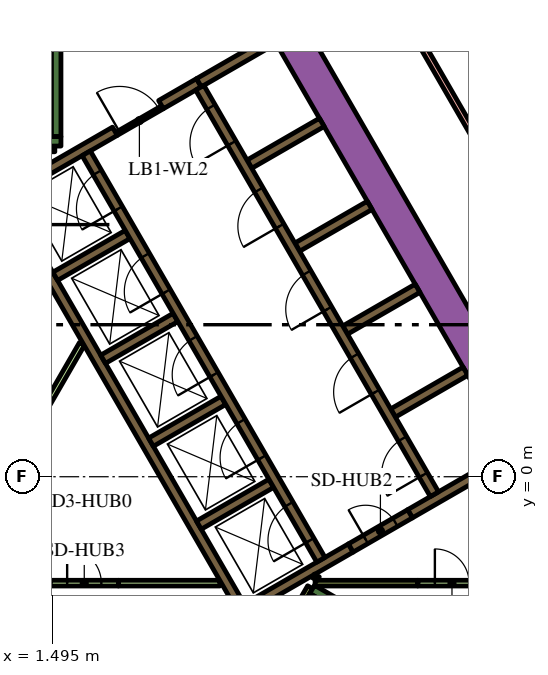
"""IFC4 building model, lengths in metres.
Left out: names, types, materials, properties, quantities, classifications, styles, units other than length and angle.
Written with IfcOpenShell. Run it as: python <this file> out.ifc"""

import sys

from ifc_helpers import new_model, si_unit, direction, frame, frame_2d, origin, place, context, subcontext, project, spatial, polyline, rectangle, outline, extrude, element, fill, save


model = new_model("IFC4")
c1 = context("Model", 3, precision=1e-05, world=origin(), true_north=direction((0.0, 1.0)))
c2 = subcontext(c1, "Body", "Model", "MODEL_VIEW")
j1 = project(units=[si_unit("LENGTHUNIT", "METRE"), si_unit("PLANEANGLEUNIT", "RADIAN")], contexts=[c1])
p1 = place(None, origin())
s1 = spatial("IfcSite", under=j1, at=p1, CompositionType="ELEMENT")
p2 = place(p1, origin())
s2 = spatial("IfcBuilding", under=s1, at=p2, CompositionType="ELEMENT")
p3 = place(p2, frame((0.0, 0.0, 134.4)))
s3 = spatial("IfcBuildingStorey", under=s2, at=p3, CompositionType="ELEMENT", Elevation=134.4)
p4 = place(p3, frame((6.776, 13.364, 0.0), z_axis=(0.0, 0.0, 1.0), x_axis=(0.500004177138, -0.8660229921, 0.0)))
e1 = element("IfcWall", 1, at=p4, inside=s3, PredefinedType="SOLIDWALL", context=c2, shape_type="SweptSolid", body=[
    extrude(rectangle(XDim=20.204, YDim=0.9, at=frame_2d((10.102, 0.0))), origin(), (0.0, 0.0, 1.0), 7.2),
])
p5 = place(p3, frame((8.334, -2.964, 0.0), z_axis=(0.0, 0.0, 1.0), x_axis=(0.866016039709, -0.500016218704, 0.0)))
e2 = element("IfcWall", 2, at=p5, inside=s3, PredefinedType="SOLIDWALL", context=c2, shape_type="SweptSolid", body=[
    extrude(rectangle(XDim=7.05, YDim=0.25, at=frame_2d((3.525, 0.0))), origin(), (0.0, 0.0, 1.0), 7.2),
])
p6 = place(p3, frame((8.163, -3.511, 0.0), z_axis=(0.0, 0.0, 1.0), x_axis=(0.500127794843, 0.865951608824, 0.0)))
e3 = element("IfcWall", 3, at=p6, inside=s3, PredefinedType="SOLIDWALL", context=c2, shape_type="SweptSolid", body=[
    extrude(rectangle(XDim=0.435, YDim=0.25, at=frame_2d((0.217, 0.0))), origin(), (0.0, 0.0, 1.0), 7.2),
])
p7 = place(p3, frame((1.6, 8.95, 0.0), z_axis=(0.0, 0.0, 1.0), x_axis=(0.0, 1.0, 0.0)))
e4 = element("IfcWall", 4, at=p7, inside=s3, PredefinedType="SOLIDWALL", context=c2, shape_type="SweptSolid", body=[
    extrude(rectangle(XDim=6.8, YDim=0.25, at=frame_2d((3.4, 0.0))), origin(), (0.0, 0.0, 1.0), 7.2),
])
p8 = place(p3, frame((1.05, 8.825, 0.0), z_axis=(0.0, 0.0, 1.0), x_axis=(1.0, 0.0, 0.0)))
e5 = element("IfcWall", 5, at=p8, inside=s3, PredefinedType="SOLIDWALL", context=c2, shape_type="SweptSolid", body=[
    extrude(rectangle(XDim=0.675, YDim=0.25, at=frame_2d((0.337, 0.0))), origin(), (0.0, 0.0, 1.0), 7.2),
])
p9 = place(p3, origin())
e6 = element("IfcWall", 6, at=p9, inside=s3, PredefinedType="SOLIDWALL", context=c2, shape_type="SweptSolid", body=[
    extrude(outline(polyline([(0.335, 6.925), (0.335, 6.925), (0.335, 7.075), (0.335, 7.075), (0.335, 7.075), (0.245, 7.075), (0.035, 7.439), (0.252, 7.564), (0.377, 7.348), (1.512, 5.382), (1.637, 5.165), (2.221, 4.153), (2.771, 3.199), (2.896, 2.983), (3.138, 2.564), (4.031, 1.017), (4.156, 0.801), (5.292, -1.165), (5.417, -1.382), (6.073, -2.519), (6.552, -3.348), (6.677, -3.564), (6.46, -3.689), (0.332, 6.925), (0.335, 6.925), (0.335, 6.925)])), origin(), (0.0, 0.0, 1.0), 7.2),
])
p10 = place(p3, frame((4.358, 9.791, 0.0), z_axis=(0.0, 0.0, 1.0), x_axis=(0.866079547155, 0.499906209203, 0.0)))
e7 = element("IfcWall", 7, at=p10, inside=s3, PredefinedType="SOLIDWALL", context=c2, shape_type="SweptSolid", body=[
    extrude(rectangle(XDim=1.15, YDim=0.25, at=frame_2d((0.575, 0.0))), origin(), (0.0, 0.0, 1.0), 7.2),
])
p11 = place(p3, frame((5.356, 10.367, 0.0), z_axis=(0.0, 0.0, 1.0), x_axis=(0.865978535641, 0.50008116922, 0.0)))
e8 = element("IfcWall", 8, at=p11, inside=s3, PredefinedType="SOLIDWALL", context=c2, shape_type="SweptSolid", body=[
    extrude(rectangle(XDim=2.278, YDim=0.25, at=frame_2d((1.139, 0.0))), origin(), (0.0, 0.0, 1.0), 7.2),
])
p12 = place(p3, frame((0.314, 7.456, 0.0), z_axis=(0.0, 0.0, 1.0), x_axis=(0.866013897511, 0.50001992892, 0.0)))
e9 = element("IfcWall", 9, at=p12, inside=s3, PredefinedType="SOLIDWALL", context=c2, shape_type="SweptSolid", body=[
    extrude(rectangle(XDim=3.268, YDim=0.25, at=frame_2d((1.634, 0.0))), origin(), (0.0, 0.0, 1.0), 7.2),
])
p13 = place(p3, frame((1.574, 5.274, 0.0), z_axis=(0.0, 0.0, 1.0), x_axis=(0.866028486751, 0.499994660107, 0.0)))
e10 = element("IfcWall", 10, at=p13, inside=s3, PredefinedType="SOLIDWALL", context=c2, shape_type="SweptSolid", body=[
    extrude(rectangle(XDim=2.2, YDim=0.25, at=frame_2d((1.1, 0.0))), origin(), (0.0, 0.0, 1.0), 7.2),
])
for number, where, z_axis, x_axis in (
    (11, (2.834, 3.091, 0.0), (0.0, 0.0, 1.0), (0.866, 0.5, 0.0)),
    (12, (4.094, 0.909, 0.0), (0.0, 0.0, 1.0), (0.866, 0.5, 0.0)),
    (13, (5.354, -1.274, 0.0), (0.0, 0.0, 1.0), (0.866, 0.5, 0.0)),
):
    element("IfcWall", number, at=place(p3, frame(where, z_axis=z_axis, x_axis=x_axis)), inside=s3, PredefinedType="SOLIDWALL", context=c2, shape_type="SweptSolid", body=[
        extrude(rectangle(XDim=2.2, YDim=0.25, at=frame_2d((1.1, 0.0))), origin(), (0.0, 0.0, 1.0), 7.2),
    ])
p14 = place(p3, frame((9.352, -1.875, 0.0), z_axis=(0.0, 0.0, 1.0), x_axis=(-0.866024844342, -0.500000968981, 0.0)))
e14 = element("IfcWall", 14, at=p14, inside=s3, PredefinedType="SOLIDWALL", context=c2, shape_type="SweptSolid", body=[
    extrude(rectangle(XDim=3.162, YDim=0.25, at=frame_2d((1.581, 0.0))), origin(), (0.0, 0.0, 1.0), 7.2),
])
for number, where, z_axis, x_axis in (
    (15, (6.684, 8.224, 0.0), (0.0, 0.0, 1.0), (0.866, 0.5, 0.0)),
    (16, (7.944, 6.041, 0.0), (0.0, 0.0, 1.0), (0.866, 0.5, 0.0)),
    (17, (9.204, 3.859, 0.0), (0.0, 0.0, 1.0), (0.866, 0.5, 0.0)),
):
    element("IfcWall", number, at=place(p3, frame(where, z_axis=z_axis, x_axis=x_axis)), inside=s3, PredefinedType="SOLIDWALL", context=c2, shape_type="SweptSolid", body=[
        extrude(rectangle(XDim=2.2, YDim=0.25, at=frame_2d((1.1, 0.0))), origin(), (0.0, 0.0, 1.0), 7.2),
    ])
p15 = place(p3, frame((10.911, -0.975, 0.0), z_axis=(0.0, 0.0, 1.0), x_axis=(0.866046979468, 0.499962627957, 0.0)))
e18 = element("IfcWall", 18, at=p15, inside=s3, PredefinedType="SOLIDWALL", context=c2, shape_type="SweptSolid", body=[
    extrude(rectangle(XDim=3.138, YDim=0.25, at=frame_2d((1.569, 0.0))), origin(), (0.0, 0.0, 1.0), 7.2),
])
p16 = place(p3, frame((10.464, 1.677, 0.0), z_axis=(0.0, 0.0, 1.0), x_axis=(0.86605622881, 0.499946605688, 0.0)))
e19 = element("IfcWall", 19, at=p16, inside=s3, PredefinedType="SOLIDWALL", context=c2, shape_type="SweptSolid", body=[
    extrude(rectangle(XDim=2.2, YDim=0.25, at=frame_2d((1.1, 0.0))), origin(), (0.0, 0.0, 1.0), 7.2),
])
p17 = place(p3, frame((8.412, -2.8, 0.0), z_axis=(0.0, 0.0, 1.0), x_axis=(1.0, 0.0, 0.0)))
e20 = element("IfcWall", 20, at=p17, inside=s3, PredefinedType="PARTITIONING", context=c2, shape_type="SweptSolid", body=[
    extrude(rectangle(XDim=2.702, YDim=0.15, at=frame_2d((1.351, 0.0))), origin(), (0.0, 0.0, 1.0), 7.2),
])
p18 = place(p3, frame((8.459, -2.599, 0.0), z_axis=(0.0, 0.0, 1.0), x_axis=(-0.501919277433, -0.864914469148, 0.0)))
e21 = element("IfcWall", 21, at=p18, inside=s3, PredefinedType="PARTITIONING", context=c2, shape_type="SweptSolid", body=[
    extrude(rectangle(XDim=0.109, YDim=0.15, at=frame_2d((0.054, 0.0))), origin(), (0.0, 0.0, 1.0), 7.2),
])
p19 = place(p3, frame((8.281, -2.907, 0.0), z_axis=(0.0, 0.0, 1.0), x_axis=(-0.500193841991, -0.86591346013, 0.0)))
e22 = element("IfcWall", 22, at=p19, inside=s3, PredefinedType="PARTITIONING", context=c2, shape_type="SweptSolid", body=[
    extrude(rectangle(XDim=0.583, YDim=0.15, at=frame_2d((0.292, 0.0))), origin(), (0.0, 0.0, 1.0), 7.2),
])
p20 = place(p3, frame((3.238, -2.8, 0.0), z_axis=(0.0, 0.0, 1.0), x_axis=(1.0, 0.0, 0.0)))
e23 = element("IfcWall", 23, at=p20, inside=s3, PredefinedType="PARTITIONING", context=c2, shape_type="SweptSolid", body=[
    extrude(rectangle(XDim=2.672, YDim=0.15, at=frame_2d((1.336, 0.0))), origin(), (0.0, 0.0, 1.0), 6.15),
])
p21 = place(p3, frame((1.016, 1.309, 0.0), z_axis=(0.0, 0.0, 1.0), x_axis=(0.49998231768, 0.866035612436, 0.0)))
e24 = element("IfcWall", 24, at=p21, inside=s3, PredefinedType="PARTITIONING", context=c2, shape_type="SweptSolid", body=[
    extrude(rectangle(XDim=2.521, YDim=0.15, at=frame_2d((1.26, 0.0))), origin(), (0.0, 0.0, 1.0), 6.15),
])
p22 = place(p3, frame((1.05, 8.625, 0.0), z_axis=(0.0, 0.0, 1.0), x_axis=(1.0, 0.0, 0.0)))
e25 = element("IfcWall", 25, at=p22, inside=s3, PredefinedType="PARTITIONING", context=c2, shape_type="SweptSolid", body=[
    extrude(rectangle(XDim=0.514, YDim=0.15, at=frame_2d((0.257, 0.0))), origin(), (0.0, 0.0, 1.0), 6.15),
])
p23 = place(p3, frame((11.553, -0.46, 0.0), z_axis=(0.0, 0.0, 1.0), x_axis=(-0.500006514828, 0.866021642414, 0.0)))
e26 = element("IfcWall", 26, at=p23, inside=s3, PredefinedType="SOLIDWALL", context=c2, shape_type="SweptSolid", body=[
    extrude(rectangle(XDim=12.35, YDim=0.25, at=frame_2d((6.175, 0.0))), origin(), (0.0, 0.0, 1.0), 7.2),
])
p24 = place(p23, frame((0.585, 0.0, 0.0)))
e27 = element("IfcOpeningElement", 27, at=p24, cuts=e26, PredefinedType="OPENING", context=c2, shape_type="SweptSolid", body=[
    extrude(rectangle(XDim=1.1, YDim=2.1, at=frame_2d((0.55, 1.05))), frame((0.0, 0.135, 0.0), z_axis=(0.0, -1.0, 0.0), x_axis=(1.0, 0.0, 0.0)), (0.0, 0.0, 1.0), 0.27),
])
p25 = place(p23, frame((3.105, 0.0, 0.0)))
e28 = element("IfcOpeningElement", 28, at=p25, cuts=e26, PredefinedType="OPENING", context=c2, shape_type="SweptSolid", body=[
    extrude(rectangle(XDim=1.1, YDim=2.1, at=frame_2d((0.55, 1.05))), frame((0.0, 0.135, 0.0), z_axis=(0.0, -1.0, 0.0), x_axis=(1.0, 0.0, 0.0)), (0.0, 0.0, 1.0), 0.27),
])
p26 = place(p23, frame((5.625, 0.0, 0.0)))
e29 = element("IfcOpeningElement", 29, at=p26, cuts=e26, PredefinedType="OPENING", context=c2, shape_type="SweptSolid", body=[
    extrude(rectangle(XDim=1.1, YDim=2.1, at=frame_2d((0.55, 1.05))), frame((0.0, 0.135, 0.0), z_axis=(0.0, -1.0, 0.0), x_axis=(1.0, 0.0, 0.0)), (0.0, 0.0, 1.0), 0.27),
])
p27 = place(p23, frame((8.145, 0.0, 0.0)))
e30 = element("IfcOpeningElement", 30, at=p27, cuts=e26, PredefinedType="OPENING", context=c2, shape_type="SweptSolid", body=[
    extrude(rectangle(XDim=1.1, YDim=2.1, at=frame_2d((0.55, 1.05))), frame((0.0, 0.135, 0.0), z_axis=(0.0, -1.0, 0.0), x_axis=(1.0, 0.0, 0.0)), (0.0, 0.0, 1.0), 0.27),
])
p28 = place(p23, frame((10.665, 0.0, 0.0)))
e31 = element("IfcOpeningElement", 31, at=p28, cuts=e26, PredefinedType="OPENING", context=c2, shape_type="SweptSolid", body=[
    extrude(rectangle(XDim=1.1, YDim=2.1, at=frame_2d((0.55, 1.05))), frame((0.0, 0.135, 0.0), z_axis=(0.0, -1.0, 0.0), x_axis=(1.0, 0.0, 0.0)), (0.0, 0.0, 1.0), 0.27),
])
p29 = place(p3, frame((8.565, -2.185, 0.0), z_axis=(0.0, 0.0, 1.0), x_axis=(-0.499997954832, 0.866026584559, 0.0)))
e32 = element("IfcWall", 32, at=p29, inside=s3, PredefinedType="SOLIDWALL", context=c2, shape_type="SweptSolid", body=[
    extrude(rectangle(XDim=12.35, YDim=0.25, at=frame_2d((6.175, 0.0))), origin(), (0.0, 0.0, 1.0), 7.2),
])
p30 = place(p29, frame((0.585, 0.0, 0.0)))
e33 = element("IfcOpeningElement", 33, at=p30, cuts=e32, PredefinedType="OPENING", context=c2, shape_type="SweptSolid", body=[
    extrude(rectangle(XDim=1.1, YDim=2.1, at=frame_2d((0.55, 1.05))), frame((0.0, 0.135, 0.0), z_axis=(0.0, -1.0, 0.0), x_axis=(1.0, 0.0, 0.0)), (0.0, 0.0, 1.0), 0.27),
])
p31 = place(p29, frame((3.105, 0.0, 0.0)))
e34 = element("IfcOpeningElement", 34, at=p31, cuts=e32, PredefinedType="OPENING", context=c2, shape_type="SweptSolid", body=[
    extrude(rectangle(XDim=1.1, YDim=2.1, at=frame_2d((0.55, 1.05))), frame((0.0, 0.135, 0.0), z_axis=(0.0, -1.0, 0.0), x_axis=(1.0, 0.0, 0.0)), (0.0, 0.0, 1.0), 0.27),
])
p32 = place(p29, frame((5.625, 0.0, 0.0)))
e35 = element("IfcOpeningElement", 35, at=p32, cuts=e32, PredefinedType="OPENING", context=c2, shape_type="SweptSolid", body=[
    extrude(rectangle(XDim=1.1, YDim=2.1, at=frame_2d((0.55, 1.05))), frame((0.0, 0.135, 0.0), z_axis=(0.0, -1.0, 0.0), x_axis=(1.0, 0.0, 0.0)), (0.0, 0.0, 1.0), 0.27),
])
p33 = place(p29, frame((8.145, 0.0, 0.0)))
e36 = element("IfcOpeningElement", 36, at=p33, cuts=e32, PredefinedType="OPENING", context=c2, shape_type="SweptSolid", body=[
    extrude(rectangle(XDim=1.1, YDim=2.1, at=frame_2d((0.55, 1.05))), frame((0.0, 0.135, 0.0), z_axis=(0.0, -1.0, 0.0), x_axis=(1.0, 0.0, 0.0)), (0.0, 0.0, 1.0), 0.27),
])
p34 = place(p29, frame((10.665, 0.0, 0.0)))
e37 = element("IfcOpeningElement", 37, at=p34, cuts=e32, PredefinedType="OPENING", context=c2, shape_type="SweptSolid", body=[
    extrude(rectangle(XDim=1.1, YDim=2.1, at=frame_2d((0.55, 1.05))), frame((0.0, 0.135, 0.0), z_axis=(0.0, -1.0, 0.0), x_axis=(1.0, 0.0, 0.0)), (0.0, 0.0, 1.0), 0.27),
])
p35 = place(p3, frame((3.183, 9.02, 0.0), z_axis=(0.0, 0.0, 1.0), x_axis=(0.866034573852, 0.49998411664, 0.0)))
e38 = element("IfcWall", 38, at=p35, inside=s3, PredefinedType="PARTITIONING", context=c2, shape_type="SweptSolid", body=[
    extrude(rectangle(XDim=1.4, YDim=0.09, at=frame_2d((0.7, 0.0))), origin(), (0.0, 0.0, 1.0), 6.15),
])
p36 = place(p35, frame((0.1, 0.0, 0.0)))
e39 = element("IfcOpeningElement", 39, at=p36, cuts=e38, PredefinedType="OPENING", context=c2, shape_type="SweptSolid", body=[
    extrude(rectangle(XDim=1.2, YDim=2.1, at=frame_2d((0.6, 1.05))), frame((0.0, 0.055, 0.0), z_axis=(0.0, -1.0, 0.0), x_axis=(1.0, 0.0, 0.0)), (0.0, 0.0, 1.0), 0.11),
])
p37 = place(p3, frame((9.352, -1.875, 0.0), z_axis=(0.0, 0.0, 1.0), x_axis=(0.865989075817, 0.500062916607, 0.0)))
e40 = element("IfcWall", 40, at=p37, inside=s3, PredefinedType="SOLIDWALL", context=c2, shape_type="SweptSolid", body=[
    extrude(rectangle(XDim=1.8, YDim=0.25, at=frame_2d((0.9, 0.0))), origin(), (0.0, 0.0, 1.0), 7.2),
])
p38 = place(p37, frame((0.45, 0.0, 0.0)))
e41 = element("IfcOpeningElement", 41, at=p38, cuts=e40, PredefinedType="OPENING", context=c2, shape_type="SweptSolid", body=[
    extrude(rectangle(XDim=0.9, YDim=2.1, at=frame_2d((0.45, 1.05))), frame((0.0, 0.135, 0.0), z_axis=(0.0, -1.0, 0.0), x_axis=(1.0, 0.0, 0.0)), (0.0, 0.0, 1.0), 0.27),
])
p39 = place(p3, frame((1.438, -2.8, 0.0), z_axis=(0.0, 0.0, 1.0), x_axis=(1.0, 0.0, 0.0)))
e42 = element("IfcWall", 42, at=p39, inside=s3, PredefinedType="PARTITIONING", context=c2, shape_type="SweptSolid", body=[
    extrude(rectangle(XDim=1.8, YDim=0.15, at=frame_2d((0.9, 0.0))), origin(), (0.0, 0.0, 1.0), 6.15),
])
p40 = place(p39, frame((0.45, 0.0, 0.0)))
e43 = element("IfcOpeningElement", 43, at=p40, cuts=e42, PredefinedType="OPENING", context=c2, shape_type="SweptSolid", body=[
    extrude(rectangle(XDim=0.9, YDim=2.1, at=frame_2d((0.45, 1.05))), frame((0.0, 0.085, 0.0), z_axis=(0.0, -1.0, 0.0), x_axis=(1.0, 0.0, 0.0)), (0.0, 0.0, 1.0), 0.17),
])
p41 = place(p3, frame((11.115, -2.8, 0.0), z_axis=(0.0, 0.0, 1.0), x_axis=(1.0, 0.0, 0.0)))
e44 = element("IfcWall", 44, at=p41, inside=s3, PredefinedType="PARTITIONING", context=c2, shape_type="SweptSolid", body=[
    extrude(rectangle(XDim=1.8, YDim=0.15, at=frame_2d((0.9, 0.0))), origin(), (0.0, 0.0, 1.0), 6.15),
])
p42 = place(p41, frame((0.45, 0.0, 0.0)))
e45 = element("IfcOpeningElement", 45, at=p42, cuts=e44, PredefinedType="OPENING", context=c2, shape_type="SweptSolid", body=[
    extrude(rectangle(XDim=0.9, YDim=2.1, at=frame_2d((0.45, 1.05))), frame((0.0, 0.085, 0.0), z_axis=(0.0, -1.0, 0.0), x_axis=(1.0, 0.0, 0.0)), (0.0, 0.0, 1.0), 0.17),
])
p43 = place(p3, frame((20.034, -3.9, 0.0), z_axis=(0.0, 0.0, 1.0), x_axis=(-0.500006098403, 0.866021882841, 0.0)))
e46 = element("IfcWall", 46, at=p43, inside=s3, PredefinedType="PARTITIONING", context=c2, shape_type="SweptSolid", body=[
    extrude(rectangle(XDim=22.774, YDim=0.15, at=frame_2d((11.387, 0.0))), origin(), (0.0, 0.0, 1.0), 6.15),
])
p44 = place(p43, frame((10.487, 0.0, 0.0)))
e47 = element("IfcOpeningElement", 47, at=p44, cuts=e46, PredefinedType="OPENING", context=c2, shape_type="SweptSolid", body=[
    extrude(rectangle(XDim=1.8, YDim=2.1, at=frame_2d((0.9, 1.05))), frame((0.0, 0.085, 0.0), z_axis=(0.0, -1.0, 0.0), x_axis=(1.0, 0.0, 0.0)), (0.0, 0.0, 1.0), 0.17),
])
p45 = place(p43, frame((7.377, 0.0, 0.0)))
e48 = element("IfcOpeningElement", 48, at=p45, cuts=e46, PredefinedType="OPENING", context=c2, shape_type="SweptSolid", body=[
    extrude(rectangle(XDim=1.8, YDim=2.1, at=frame_2d((0.9, 1.05))), frame((0.0, 0.085, 0.0), z_axis=(0.0, -1.0, 0.0), x_axis=(1.0, 0.0, 0.0)), (0.0, 0.0, 1.0), 0.17),
])
p46 = place(p24, origin())
e49 = element("IfcDoor", 49, at=p46, inside=s3, OperationType="DOUBLE_DOOR_SLIDING", PredefinedType="DOOR", context=c2, shape_type="SweptSolid", body=[
    extrude(rectangle(XDim=1.1, YDim=2.1, at=frame_2d((0.55, 1.05))), frame((0.0, 0.025, 0.0), z_axis=(0.0, -1.0, 0.0), x_axis=(1.0, 0.0, 0.0)), (0.0, 0.0, 1.0), 0.05),
])
fill(e27, e49)
p47 = place(p25, origin())
e50 = element("IfcDoor", 50, at=p47, inside=s3, OperationType="DOUBLE_DOOR_SLIDING", PredefinedType="DOOR", context=c2, shape_type="SweptSolid", body=[
    extrude(rectangle(XDim=1.1, YDim=2.1, at=frame_2d((0.55, 1.05))), frame((0.0, 0.025, 0.0), z_axis=(0.0, -1.0, 0.0), x_axis=(1.0, 0.0, 0.0)), (0.0, 0.0, 1.0), 0.05),
])
fill(e28, e50)
p48 = place(p26, origin())
e51 = element("IfcDoor", 51, at=p48, inside=s3, OperationType="DOUBLE_DOOR_SLIDING", PredefinedType="DOOR", context=c2, shape_type="SweptSolid", body=[
    extrude(rectangle(XDim=1.1, YDim=2.1, at=frame_2d((0.55, 1.05))), frame((0.0, 0.025, 0.0), z_axis=(0.0, -1.0, 0.0), x_axis=(1.0, 0.0, 0.0)), (0.0, 0.0, 1.0), 0.05),
])
fill(e29, e51)
p49 = place(p27, origin())
e52 = element("IfcDoor", 52, at=p49, inside=s3, OperationType="DOUBLE_DOOR_SLIDING", PredefinedType="DOOR", context=c2, shape_type="SweptSolid", body=[
    extrude(rectangle(XDim=1.1, YDim=2.1, at=frame_2d((0.55, 1.05))), frame((0.0, 0.025, 0.0), z_axis=(0.0, -1.0, 0.0), x_axis=(1.0, 0.0, 0.0)), (0.0, 0.0, 1.0), 0.05),
])
fill(e30, e52)
p50 = place(p28, origin())
e53 = element("IfcDoor", 53, at=p50, inside=s3, OperationType="DOUBLE_DOOR_SLIDING", PredefinedType="DOOR", context=c2, shape_type="SweptSolid", body=[
    extrude(rectangle(XDim=1.1, YDim=2.1, at=frame_2d((0.55, 1.05))), frame((0.0, 0.025, 0.0), z_axis=(0.0, -1.0, 0.0), x_axis=(1.0, 0.0, 0.0)), (0.0, 0.0, 1.0), 0.05),
])
fill(e31, e53)
p51 = place(p30, origin())
e54 = element("IfcDoor", 54, at=p51, inside=s3, OperationType="DOUBLE_DOOR_SLIDING", PredefinedType="DOOR", context=c2, shape_type="SweptSolid", body=[
    extrude(rectangle(XDim=1.1, YDim=2.1, at=frame_2d((0.55, 1.05))), frame((0.0, 0.025, 0.0), z_axis=(0.0, -1.0, 0.0), x_axis=(1.0, 0.0, 0.0)), (0.0, 0.0, 1.0), 0.05),
])
fill(e33, e54)
p52 = place(p31, origin())
e55 = element("IfcDoor", 55, at=p52, inside=s3, OperationType="DOUBLE_DOOR_SLIDING", PredefinedType="DOOR", context=c2, shape_type="SweptSolid", body=[
    extrude(rectangle(XDim=1.1, YDim=2.1, at=frame_2d((0.55, 1.05))), frame((0.0, 0.025, 0.0), z_axis=(0.0, -1.0, 0.0), x_axis=(1.0, 0.0, 0.0)), (0.0, 0.0, 1.0), 0.05),
])
fill(e34, e55)
p53 = place(p32, origin())
e56 = element("IfcDoor", 56, at=p53, inside=s3, OperationType="DOUBLE_DOOR_SLIDING", PredefinedType="DOOR", context=c2, shape_type="SweptSolid", body=[
    extrude(rectangle(XDim=1.1, YDim=2.1, at=frame_2d((0.55, 1.05))), frame((0.0, 0.025, 0.0), z_axis=(0.0, -1.0, 0.0), x_axis=(1.0, 0.0, 0.0)), (0.0, 0.0, 1.0), 0.05),
])
fill(e35, e56)
p54 = place(p33, origin())
e57 = element("IfcDoor", 57, at=p54, inside=s3, OperationType="DOUBLE_DOOR_SLIDING", PredefinedType="DOOR", context=c2, shape_type="SweptSolid", body=[
    extrude(rectangle(XDim=1.1, YDim=2.1, at=frame_2d((0.55, 1.05))), frame((0.0, 0.025, 0.0), z_axis=(0.0, -1.0, 0.0), x_axis=(1.0, 0.0, 0.0)), (0.0, 0.0, 1.0), 0.05),
])
fill(e36, e57)
p55 = place(p34, origin())
e58 = element("IfcDoor", 58, at=p55, inside=s3, OperationType="DOUBLE_DOOR_SLIDING", PredefinedType="DOOR", context=c2, shape_type="SweptSolid", body=[
    extrude(rectangle(XDim=1.1, YDim=2.1, at=frame_2d((0.55, 1.05))), frame((0.0, 0.025, 0.0), z_axis=(0.0, -1.0, 0.0), x_axis=(1.0, 0.0, 0.0)), (0.0, 0.0, 1.0), 0.05),
])
fill(e37, e58)
p56 = place(p36, origin())
e59 = element("IfcDoor", 59, at=p56, inside=s3, OperationType="SINGLE_SWING_LEFT", PredefinedType="DOOR", context=c2, shape_type="SweptSolid", body=[
    extrude(rectangle(XDim=1.2, YDim=2.1, at=frame_2d((0.6, 1.05))), frame((0.0, 0.025, 0.0), z_axis=(0.0, -1.0, 0.0), x_axis=(1.0, 0.0, 0.0)), (0.0, 0.0, 1.0), 0.05),
])
fill(e39, e59)
p57 = place(p38, origin())
e60 = element("IfcDoor", 60, at=p57, inside=s3, OperationType="SINGLE_SWING_LEFT", PredefinedType="DOOR", context=c2, shape_type="SweptSolid", body=[
    extrude(rectangle(XDim=0.9, YDim=2.1, at=frame_2d((0.45, 1.05))), frame((0.0, 0.025, 0.0), z_axis=(0.0, -1.0, 0.0), x_axis=(1.0, 0.0, 0.0)), (0.0, 0.0, 1.0), 0.05),
])
fill(e41, e60)
p58 = place(p40, origin())
e61 = element("IfcDoor", 61, at=p58, inside=s3, OperationType="SINGLE_SWING_LEFT", PredefinedType="DOOR", context=c2, shape_type="SweptSolid", body=[
    extrude(rectangle(XDim=0.9, YDim=2.1, at=frame_2d((0.45, 1.05))), frame((0.0, 0.025, 0.0), z_axis=(0.0, -1.0, 0.0), x_axis=(1.0, 0.0, 0.0)), (0.0, 0.0, 1.0), 0.05),
])
fill(e43, e61)
p59 = place(p42, origin())
e62 = element("IfcDoor", 62, at=p59, inside=s3, OperationType="SINGLE_SWING_LEFT", PredefinedType="DOOR", context=c2, shape_type="SweptSolid", body=[
    extrude(rectangle(XDim=0.9, YDim=2.1, at=frame_2d((0.45, 1.05))), frame((0.0, 0.025, 0.0), z_axis=(0.0, -1.0, 0.0), x_axis=(1.0, 0.0, 0.0)), (0.0, 0.0, 1.0), 0.05),
])
fill(e45, e62)
save(model, sys.argv[1])
